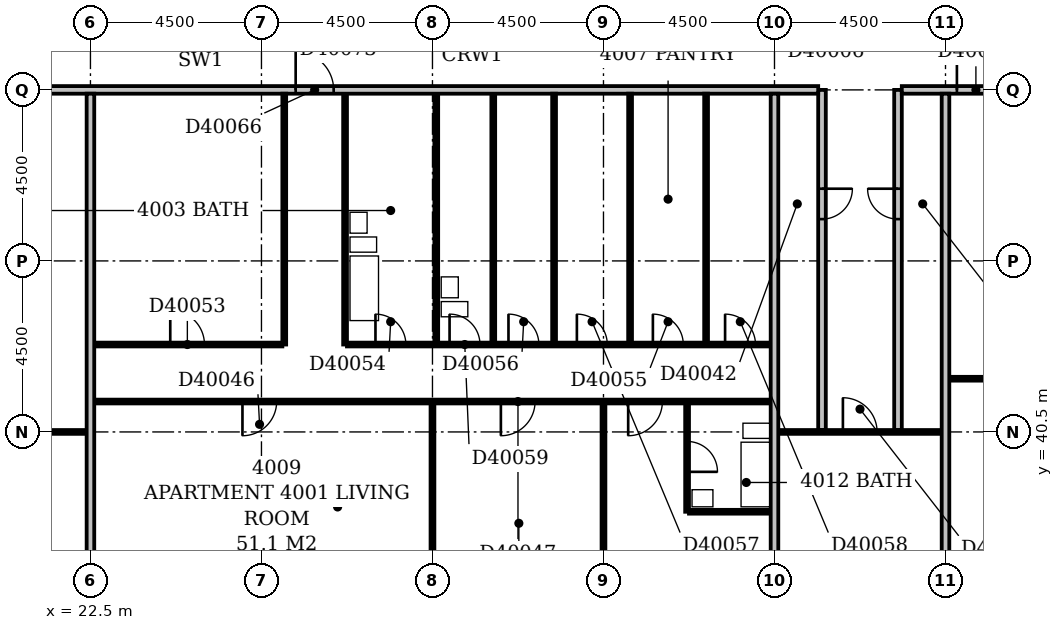
"""IFC4 building model, lengths in metres.
Left out: names, types, materials, properties, quantities, classifications, styles, units other than length and angle.
Written with IfcOpenShell. Run it as: python <this file> out.ifc"""

import sys

from ifc_helpers import new_model, si_unit, direction, frame, frame_2d, origin, place, context, subcontext, project, spatial, rectangle, extrude, element, fill, save


model = new_model("IFC4")
c1 = context("Model", 3, precision=1e-05, world=origin(), true_north=direction((0.0, 1.0)))
c2 = subcontext(c1, "Body", "Model", "MODEL_VIEW")
j1 = project(units=[si_unit("LENGTHUNIT", "METRE"), si_unit("PLANEANGLEUNIT", "RADIAN")], contexts=[c1])
p1 = place(None, origin())
s1 = spatial("IfcSite", under=j1, at=p1, CompositionType="ELEMENT")
p2 = place(p1, origin())
s2 = spatial("IfcBuilding", under=s1, at=p2, CompositionType="ELEMENT")
p3 = place(p2, frame((0.0, 0.0, 159.2)))
s3 = spatial("IfcBuildingStorey", under=s2, at=p3, CompositionType="ELEMENT", Elevation=159.2)
p4 = place(p3, frame((22.5, 36.5, 0.0), z_axis=(0.0, 0.0, 1.0), x_axis=(0.0, 1.0, 0.0)))
e1 = element("IfcWall", 1, at=p4, inside=s3, PredefinedType="PARTITIONING", context=c2, shape_type="SweptSolid", body=[
    extrude(rectangle(XDim=12.9, YDim=0.2, at=frame_2d((6.45, 0.0))), origin(), (0.0, 0.0, 1.0), 3.3),
])
p5 = place(p3, frame((31.5, 36.5, 0.0), z_axis=(0.0, 0.0, 1.0), x_axis=(0.0, 1.0, 0.0)))
e2 = element("IfcWall", 2, at=p5, inside=s3, PredefinedType="PARTITIONING", context=c2, shape_type="SweptSolid", body=[
    extrude(rectangle(XDim=4.75, YDim=0.1, at=frame_2d((2.375, 0.0))), origin(), (0.0, 0.0, 1.0), 3.3),
])
p6 = place(p3, frame((36.0, 36.5, 0.0), z_axis=(0.0, 0.0, 1.0), x_axis=(0.0, 1.0, 0.0)))
e3 = element("IfcWall", 3, at=p6, inside=s3, PredefinedType="PARTITIONING", context=c2, shape_type="SweptSolid", body=[
    extrude(rectangle(XDim=4.75, YDim=0.1, at=frame_2d((2.375, 0.0))), origin(), (0.0, 0.0, 1.0), 2.4),
])
p7 = place(p3, frame((40.5, 36.5, 0.0), z_axis=(0.0, 0.0, 1.0), x_axis=(0.0, 1.0, 0.0)))
e4 = element("IfcWall", 4, at=p7, inside=s3, PredefinedType="PARTITIONING", context=c2, shape_type="SweptSolid", body=[
    extrude(rectangle(XDim=12.9, YDim=0.2, at=frame_2d((6.45, 0.0))), origin(), (0.0, 0.0, 1.0), 3.3),
])
p8 = place(p3, frame((45.0, 36.5, 0.0), z_axis=(0.0, 0.0, 1.0), x_axis=(0.0, 1.0, 0.0)))
e5 = element("IfcWall", 5, at=p8, inside=s3, PredefinedType="PARTITIONING", context=c2, shape_type="SweptSolid", body=[
    extrude(rectangle(XDim=12.9, YDim=0.2, at=frame_2d((6.45, 0.0))), origin(), (0.0, 0.0, 1.0), 2.6),
])
p9 = place(p3, frame((38.2, 38.4, 0.0), z_axis=(0.0, 0.0, 1.0), x_axis=(0.0, 1.0, 0.0)))
e6 = element("IfcWall", 6, at=p9, inside=s3, PredefinedType="PLUMBINGWALL", context=c2, shape_type="SweptSolid", body=[
    extrude(rectangle(XDim=2.85, YDim=0.1, at=frame_2d((1.425, 0.0))), origin(), (0.0, 0.0, 1.0), 3.3),
])
p10 = place(p9, frame((1.05, 0.0, 0.0)))
e7 = element("IfcOpeningElement", 7, at=p10, cuts=e6, PredefinedType="OPENING", context=c2, shape_type="SweptSolid", body=[
    extrude(rectangle(XDim=0.8, YDim=2.1, at=frame_2d((0.4, 1.05))), frame((0.0, 0.062, 0.0), z_axis=(0.0, -1.0, 0.0), x_axis=(1.0, 0.0, 0.0)), (0.0, 0.0, 1.0), 0.124),
])
p11 = place(p3, frame((38.25, 38.4, 0.0), z_axis=(0.0, 0.0, 1.0), x_axis=(1.0, 0.0, 0.0)))
e8 = element("IfcWall", 8, at=p11, inside=s3, PredefinedType="PLUMBINGWALL", context=c2, shape_type="SweptSolid", body=[
    extrude(rectangle(XDim=2.15, YDim=0.1, at=frame_2d((1.075, 0.0))), origin(), (0.0, 0.0, 1.0), 3.3),
])
p12 = place(p3, frame((9.1, 40.5, 0.0), z_axis=(0.0, 0.0, 1.0), x_axis=(1.0, 0.0, 0.0)))
e9 = element("IfcWall", 9, at=p12, inside=s3, PredefinedType="PARTITIONING", context=c2, shape_type="SweptSolid", body=[
    extrude(rectangle(XDim=13.3, YDim=0.1, at=frame_2d((6.65, 0.0))), origin(), (0.0, 0.0, 1.0), 3.3),
])
p13 = place(p3, frame((40.6, 40.5, 0.0), z_axis=(0.0, 0.0, 1.0), x_axis=(1.0, 0.0, 0.0)))
e10 = element("IfcWall", 10, at=p13, inside=s3, PredefinedType="PARTITIONING", context=c2, shape_type="SweptSolid", body=[
    extrude(rectangle(XDim=4.3, YDim=0.1, at=frame_2d((2.15, 0.0))), origin(), (0.0, 0.0, 1.0), 3.3),
])
p14 = place(p13, frame((1.7, 0.0, 0.0)))
e11 = element("IfcOpeningElement", 11, at=p14, cuts=e10, PredefinedType="OPENING", context=c2, shape_type="SweptSolid", body=[
    extrude(rectangle(XDim=0.9, YDim=2.1, at=frame_2d((0.45, 1.05))), frame((0.0, 0.062, 0.0), z_axis=(0.0, -1.0, 0.0), x_axis=(1.0, 0.0, 0.0)), (0.0, 0.0, 1.0), 0.124),
])
p15 = place(p3, frame((41.75, 40.55, 0.0), z_axis=(0.0, 0.0, 1.0), x_axis=(0.0, 1.0, 0.0)))
e12 = element("IfcWall", 12, at=p15, inside=s3, PredefinedType="PARTITIONING", context=c2, shape_type="SweptSolid", body=[
    extrude(rectangle(XDim=8.95, YDim=0.2, at=frame_2d((4.475, 0.0))), origin(), (0.0, 0.0, 1.0), 3.3),
])
p16 = place(p15, frame((5.55, 0.0, 0.0)))
e13 = element("IfcOpeningElement", 13, at=p16, cuts=e12, PredefinedType="OPENING", context=c2, shape_type="SweptSolid", body=[
    extrude(rectangle(XDim=0.8, YDim=2.1, at=frame_2d((0.4, 1.05))), frame((0.0, 0.112, 0.0), z_axis=(0.0, -1.0, 0.0), x_axis=(1.0, 0.0, 0.0)), (0.0, 0.0, 1.0), 0.224),
])
p17 = place(p3, frame((43.75, 40.55, 0.0), z_axis=(0.0, 0.0, 1.0), x_axis=(0.0, 1.0, 0.0)))
e14 = element("IfcWall", 14, at=p17, inside=s3, PredefinedType="PARTITIONING", context=c2, shape_type="SweptSolid", body=[
    extrude(rectangle(XDim=8.95, YDim=0.2, at=frame_2d((4.475, 0.0))), origin(), (0.0, 0.0, 1.0), 3.3),
])
p18 = place(p17, frame((5.55, 0.0, 0.0)))
e15 = element("IfcOpeningElement", 15, at=p18, cuts=e14, PredefinedType="OPENING", context=c2, shape_type="SweptSolid", body=[
    extrude(rectangle(XDim=0.8, YDim=2.1, at=frame_2d((0.4, 1.05))), frame((0.0, 0.112, 0.0), z_axis=(0.0, -1.0, 0.0), x_axis=(1.0, 0.0, 0.0)), (0.0, 0.0, 1.0), 0.224),
])
p19 = place(p3, frame((22.6, 41.3, 0.0), z_axis=(0.0, 0.0, 1.0), x_axis=(1.0, 0.0, 0.0)))
e16 = element("IfcWall", 16, at=p19, inside=s3, PredefinedType="PARTITIONING", context=c2, shape_type="SweptSolid", body=[
    extrude(rectangle(XDim=17.8, YDim=0.1, at=frame_2d((8.9, 0.0))), origin(), (0.0, 0.0, 1.0), 3.3),
])
p20 = place(p19, frame((3.9, 0.0, 0.0)))
e17 = element("IfcOpeningElement", 17, at=p20, cuts=e16, PredefinedType="OPENING", context=c2, shape_type="SweptSolid", body=[
    extrude(rectangle(XDim=0.9, YDim=2.1, at=frame_2d((0.45, 1.05))), frame((0.0, 0.062, 0.0), z_axis=(0.0, -1.0, 0.0), x_axis=(1.0, 0.0, 0.0)), (0.0, 0.0, 1.0), 0.124),
])
p21 = place(p19, frame((10.7, 0.0, 0.0)))
e18 = element("IfcOpeningElement", 18, at=p21, cuts=e16, PredefinedType="OPENING", context=c2, shape_type="SweptSolid", body=[
    extrude(rectangle(XDim=0.9, YDim=2.1, at=frame_2d((0.45, 1.05))), frame((0.0, 0.062, 0.0), z_axis=(0.0, -1.0, 0.0), x_axis=(1.0, 0.0, 0.0)), (0.0, 0.0, 1.0), 0.124),
])
p22 = place(p19, frame((14.05, 0.0, 0.0)))
e19 = element("IfcOpeningElement", 19, at=p22, cuts=e16, PredefinedType="OPENING", context=c2, shape_type="SweptSolid", body=[
    extrude(rectangle(XDim=0.9, YDim=2.1, at=frame_2d((0.45, 1.05))), frame((0.0, 0.062, 0.0), z_axis=(0.0, -1.0, 0.0), x_axis=(1.0, 0.0, 0.0)), (0.0, 0.0, 1.0), 0.124),
])
p23 = place(p3, frame((45.1, 41.9, 0.0), z_axis=(0.0, 0.0, 1.0), x_axis=(1.0, 0.0, 0.0)))
e20 = element("IfcWall", 20, at=p23, inside=s3, PredefinedType="PARTITIONING", context=c2, shape_type="SweptSolid", body=[
    extrude(rectangle(XDim=13.3, YDim=0.1, at=frame_2d((6.65, 0.0))), origin(), (0.0, 0.0, 1.0), 3.3),
])
p24 = place(p23, frame((1.7, 0.0, 0.0)))
e21 = element("IfcOpeningElement", 21, at=p24, cuts=e20, PredefinedType="OPENING", context=c2, shape_type="SweptSolid", body=[
    extrude(rectangle(XDim=0.9, YDim=2.1, at=frame_2d((0.45, 1.05))), frame((0.0, 0.062, 0.0), z_axis=(0.0, -1.0, 0.0), x_axis=(1.0, 0.0, 0.0)), (0.0, 0.0, 1.0), 0.124),
])
p25 = place(p23, frame((6.2, 0.0, 0.0)))
e22 = element("IfcOpeningElement", 22, at=p25, cuts=e20, PredefinedType="OPENING", context=c2, shape_type="SweptSolid", body=[
    extrude(rectangle(XDim=0.9, YDim=2.1, at=frame_2d((0.45, 1.05))), frame((0.0, 0.062, 0.0), z_axis=(0.0, -1.0, 0.0), x_axis=(1.0, 0.0, 0.0)), (0.0, 0.0, 1.0), 0.124),
])
p26 = place(p23, frame((10.7, 0.0, 0.0)))
e23 = element("IfcOpeningElement", 23, at=p26, cuts=e20, PredefinedType="OPENING", context=c2, shape_type="SweptSolid", body=[
    extrude(rectangle(XDim=0.9, YDim=2.1, at=frame_2d((0.45, 1.05))), frame((0.0, 0.062, 0.0), z_axis=(0.0, -1.0, 0.0), x_axis=(1.0, 0.0, 0.0)), (0.0, 0.0, 1.0), 0.124),
])
p27 = place(p3, frame((22.6, 42.8, 0.0), z_axis=(0.0, 0.0, 1.0), x_axis=(1.0, 0.0, 0.0)))
e24 = element("IfcWall", 24, at=p27, inside=s3, PredefinedType="PARTITIONING", context=c2, shape_type="SweptSolid", body=[
    extrude(rectangle(XDim=4.95, YDim=0.1, at=frame_2d((2.475, 0.0))), origin(), (0.0, 0.0, 1.0), 3.3),
])
p28 = place(p27, frame((2.0, 0.0, 0.0)))
e25 = element("IfcOpeningElement", 25, at=p28, cuts=e24, PredefinedType="OPENING", context=c2, shape_type="SweptSolid", body=[
    extrude(rectangle(XDim=0.9, YDim=2.1, at=frame_2d((0.45, 1.05))), frame((0.0, 0.062, 0.0), z_axis=(0.0, -1.0, 0.0), x_axis=(1.0, 0.0, 0.0)), (0.0, 0.0, 1.0), 0.124),
])
p29 = place(p3, frame((27.6, 42.8, 0.0), z_axis=(0.0, 0.0, 1.0), x_axis=(0.0, 1.0, 0.0)))
e26 = element("IfcWall", 26, at=p29, inside=s3, PredefinedType="PARTITIONING", context=c2, shape_type="SweptSolid", body=[
    extrude(rectangle(XDim=6.6, YDim=0.1, at=frame_2d((3.3, 0.0))), origin(), (0.0, 0.0, 1.0), 2.6),
])
p30 = place(p3, frame((29.2, 42.8, 0.0), z_axis=(0.0, 0.0, 1.0), x_axis=(0.0, 1.0, 0.0)))
e27 = element("IfcWall", 27, at=p30, inside=s3, PredefinedType="PLUMBINGWALL", context=c2, shape_type="SweptSolid", body=[
    extrude(rectangle(XDim=6.6, YDim=0.1, at=frame_2d((3.3, 0.0))), origin(), (0.0, 0.0, 1.0), 3.3),
])
p31 = place(p3, frame((29.25, 42.8, 0.0), z_axis=(0.0, 0.0, 1.0), x_axis=(1.0, 0.0, 0.0)))
e28 = element("IfcWall", 28, at=p31, inside=s3, PredefinedType="PARTITIONING", context=c2, shape_type="SweptSolid", body=[
    extrude(rectangle(XDim=11.15, YDim=0.1, at=frame_2d((5.575, 0.0))), origin(), (0.0, 0.0, 1.0), 3.3),
])
p32 = place(p31, frame((0.75, 0.0, 0.0)))
e29 = element("IfcOpeningElement", 29, at=p32, cuts=e28, PredefinedType="OPENING", context=c2, shape_type="SweptSolid", body=[
    extrude(rectangle(XDim=0.8, YDim=2.1, at=frame_2d((0.4, 1.05))), frame((0.0, 0.062, 0.0), z_axis=(0.0, -1.0, 0.0), x_axis=(1.0, 0.0, 0.0)), (0.0, 0.0, 1.0), 0.124),
])
p33 = place(p31, frame((8.05, 0.0, 0.0)))
e30 = element("IfcOpeningElement", 30, at=p33, cuts=e28, PredefinedType="OPENING", context=c2, shape_type="SweptSolid", body=[
    extrude(rectangle(XDim=0.8, YDim=2.1, at=frame_2d((0.4, 1.05))), frame((0.0, 0.062, 0.0), z_axis=(0.0, -1.0, 0.0), x_axis=(1.0, 0.0, 0.0)), (0.0, 0.0, 1.0), 0.124),
])
p34 = place(p31, frame((4.25, 0.0, 0.0)))
e31 = element("IfcOpeningElement", 31, at=p34, cuts=e28, PredefinedType="OPENING", context=c2, shape_type="SweptSolid", body=[
    extrude(rectangle(XDim=0.8, YDim=2.1, at=frame_2d((0.4, 1.05))), frame((0.0, 0.062, 0.0), z_axis=(0.0, -1.0, 0.0), x_axis=(1.0, 0.0, 0.0)), (0.0, 0.0, 1.0), 0.124),
])
p35 = place(p31, frame((6.05, 0.0, 0.0)))
e32 = element("IfcOpeningElement", 32, at=p35, cuts=e28, PredefinedType="OPENING", context=c2, shape_type="SweptSolid", body=[
    extrude(rectangle(XDim=0.8, YDim=2.1, at=frame_2d((0.4, 1.05))), frame((0.0, 0.062, 0.0), z_axis=(0.0, -1.0, 0.0), x_axis=(1.0, 0.0, 0.0)), (0.0, 0.0, 1.0), 0.124),
])
p36 = place(p31, frame((9.95, 0.0, 0.0)))
e33 = element("IfcOpeningElement", 33, at=p36, cuts=e28, PredefinedType="OPENING", context=c2, shape_type="SweptSolid", body=[
    extrude(rectangle(XDim=0.8, YDim=2.1, at=frame_2d((0.4, 1.05))), frame((0.0, 0.062, 0.0), z_axis=(0.0, -1.0, 0.0), x_axis=(1.0, 0.0, 0.0)), (0.0, 0.0, 1.0), 0.124),
])
p37 = place(p31, frame((2.7, 0.0, 0.0)))
e34 = element("IfcOpeningElement", 34, at=p37, cuts=e28, PredefinedType="OPENING", context=c2, shape_type="SweptSolid", body=[
    extrude(rectangle(XDim=0.8, YDim=2.1, at=frame_2d((0.4, 1.05))), frame((0.0, 0.062, 0.0), z_axis=(0.0, -1.0, 0.0), x_axis=(1.0, 0.0, 0.0)), (0.0, 0.0, 1.0), 0.124),
])
for number, where, z_axis, x_axis in (
    (35, (31.6, 42.85, 0.0), (0.0, 0.0, 1.0), (0.0, 1.0, 0.0)),
    (36, (33.1, 42.85, 0.0), (0.0, 0.0, 1.0), (0.0, 1.0, 0.0)),
):
    element("IfcWall", number, at=place(p3, frame(where, z_axis=z_axis, x_axis=x_axis)), inside=s3, PredefinedType="PLUMBINGWALL", context=c2, shape_type="SweptSolid", body=[
        extrude(rectangle(XDim=6.55, YDim=0.1, at=frame_2d((3.275, 0.0))), origin(), (0.0, 0.0, 1.0), 3.3),
    ])
p38 = place(p3, frame((34.7, 42.85, 0.0), z_axis=(0.0, 0.0, 1.0), x_axis=(0.0, 1.0, 0.0)))
e37 = element("IfcWall", 37, at=p38, inside=s3, PredefinedType="PARTITIONING", context=c2, shape_type="SweptSolid", body=[
    extrude(rectangle(XDim=6.55, YDim=0.1, at=frame_2d((3.275, 0.0))), origin(), (0.0, 0.0, 1.0), 3.3),
])
p39 = place(p3, frame((36.7, 42.85, 0.0), z_axis=(0.0, 0.0, 1.0), x_axis=(0.0, 1.0, 0.0)))
e38 = element("IfcWall", 38, at=p39, inside=s3, PredefinedType="PARTITIONING", context=c2, shape_type="SweptSolid", body=[
    extrude(rectangle(XDim=6.55, YDim=0.1, at=frame_2d((3.275, 0.0))), origin(), (0.0, 0.0, 1.0), 2.4),
])
p40 = place(p3, frame((38.7, 42.85, 0.0), z_axis=(0.0, 0.0, 1.0), x_axis=(0.0, 1.0, 0.0)))
e39 = element("IfcWall", 39, at=p40, inside=s3, PredefinedType="PARTITIONING", context=c2, shape_type="SweptSolid", body=[
    extrude(rectangle(XDim=6.55, YDim=0.1, at=frame_2d((3.275, 0.0))), origin(), (0.0, 0.0, 1.0), 3.3),
])
p41 = place(p3, frame((9.1, 49.5, 0.0), z_axis=(0.0, 0.0, 1.0), x_axis=(1.0, 0.0, 0.0)))
e40 = element("IfcWall", 40, at=p41, inside=s3, PredefinedType="PARTITIONING", context=c2, shape_type="SweptSolid", body=[
    extrude(rectangle(XDim=32.55, YDim=0.2, at=frame_2d((16.275, 0.0))), origin(), (0.0, 0.0, 1.0), 3.3),
])
p42 = place(p41, frame((18.8, 0.0, 0.0)))
e41 = element("IfcOpeningElement", 41, at=p42, cuts=e40, PredefinedType="OPENING", context=c2, shape_type="SweptSolid", body=[
    extrude(rectangle(XDim=1.0, YDim=2.1, at=frame_2d((0.5, 1.05))), frame((0.0, 0.112, 0.0), z_axis=(0.0, -1.0, 0.0), x_axis=(1.0, 0.0, 0.0)), (0.0, 0.0, 1.0), 0.224),
])
p43 = place(p41, frame((6.15, 0.0, 0.0)))
e42 = element("IfcOpeningElement", 42, at=p43, cuts=e40, PredefinedType="OPENING", context=c2, shape_type="SweptSolid", body=[
    extrude(rectangle(XDim=0.9, YDim=2.1, at=frame_2d((0.45, 1.05))), frame((0.0, 0.112, 0.0), z_axis=(0.0, -1.0, 0.0), x_axis=(1.0, 0.0, 0.0)), (0.0, 0.0, 1.0), 0.224),
])
p44 = place(p3, frame((43.85, 49.5, 0.0), z_axis=(0.0, 0.0, 1.0), x_axis=(1.0, 0.0, 0.0)))
e43 = element("IfcWall", 43, at=p44, inside=s3, PredefinedType="PARTITIONING", context=c2, shape_type="SweptSolid", body=[
    extrude(rectangle(XDim=15.8, YDim=0.2, at=frame_2d((7.9, 0.0))), origin(), (0.0, 0.0, 1.0), 3.3),
])
p45 = place(p44, frame((1.45, 0.0, 0.0)))
e44 = element("IfcOpeningElement", 44, at=p45, cuts=e43, PredefinedType="OPENING", context=c2, shape_type="SweptSolid", body=[
    extrude(rectangle(XDim=1.0, YDim=2.1, at=frame_2d((0.5, 1.05))), frame((0.0, 0.112, 0.0), z_axis=(0.0, -1.0, 0.0), x_axis=(1.0, 0.0, 0.0)), (0.0, 0.0, 1.0), 0.224),
])
p46 = place(p10, frame((0.8, 0.0, 0.0), z_axis=(0.0, 0.0, 1.0), x_axis=(-1.0, 0.0, 0.0)))
e45 = element("IfcDoor", 45, at=p46, inside=s3, OperationType="SINGLE_SWING_RIGHT", PredefinedType="DOOR", context=c2, shape_type="SweptSolid", body=[
    extrude(rectangle(XDim=0.8, YDim=2.1, at=frame_2d((0.4, 1.05))), frame((0.0, 0.025, 0.0), z_axis=(0.0, -1.0, 0.0), x_axis=(1.0, 0.0, 0.0)), (0.0, 0.0, 1.0), 0.05),
])
fill(e7, e45)
p47 = place(p14, origin())
e46 = element("IfcDoor", 46, at=p47, inside=s3, OperationType="SINGLE_SWING_LEFT", PredefinedType="DOOR", context=c2, shape_type="SweptSolid", body=[
    extrude(rectangle(XDim=0.9, YDim=2.1, at=frame_2d((0.45, 1.05))), frame((0.0, 0.025, 0.0), z_axis=(0.0, -1.0, 0.0), x_axis=(1.0, 0.0, 0.0)), (0.0, 0.0, 1.0), 0.05),
])
fill(e11, e46)
p48 = place(p16, origin())
e47 = element("IfcDoor", 47, at=p48, inside=s3, OperationType="SINGLE_SWING_RIGHT", PredefinedType="DOOR", context=c2, shape_type="SweptSolid", body=[
    extrude(rectangle(XDim=0.8, YDim=2.1, at=frame_2d((0.4, 1.05))), frame((0.0, 0.025, 0.0), z_axis=(0.0, -1.0, 0.0), x_axis=(1.0, 0.0, 0.0)), (0.0, 0.0, 1.0), 0.05),
])
fill(e13, e47)
p49 = place(p18, frame((0.8, 0.0, 0.0), z_axis=(0.0, 0.0, 1.0), x_axis=(-1.0, 0.0, 0.0)))
e48 = element("IfcDoor", 48, at=p49, inside=s3, OperationType="SINGLE_SWING_LEFT", PredefinedType="DOOR", context=c2, shape_type="SweptSolid", body=[
    extrude(rectangle(XDim=0.8, YDim=2.1, at=frame_2d((0.4, 1.05))), frame((0.0, 0.025, 0.0), z_axis=(0.0, -1.0, 0.0), x_axis=(1.0, 0.0, 0.0)), (0.0, 0.0, 1.0), 0.05),
])
fill(e15, e48)
p50 = place(p20, frame((0.9, 0.0, 0.0), z_axis=(0.0, 0.0, 1.0), x_axis=(-1.0, 0.0, 0.0)))
e49 = element("IfcDoor", 49, at=p50, inside=s3, OperationType="SINGLE_SWING_RIGHT", PredefinedType="DOOR", context=c2, shape_type="SweptSolid", body=[
    extrude(rectangle(XDim=0.9, YDim=2.1, at=frame_2d((0.45, 1.05))), frame((0.0, 0.025, 0.0), z_axis=(0.0, -1.0, 0.0), x_axis=(1.0, 0.0, 0.0)), (0.0, 0.0, 1.0), 0.05),
])
fill(e17, e49)
p51 = place(p21, frame((0.9, 0.0, 0.0), z_axis=(0.0, 0.0, 1.0), x_axis=(-1.0, 0.0, 0.0)))
e50 = element("IfcDoor", 50, at=p51, inside=s3, OperationType="SINGLE_SWING_RIGHT", PredefinedType="DOOR", context=c2, shape_type="SweptSolid", body=[
    extrude(rectangle(XDim=0.9, YDim=2.1, at=frame_2d((0.45, 1.05))), frame((0.0, 0.025, 0.0), z_axis=(0.0, -1.0, 0.0), x_axis=(1.0, 0.0, 0.0)), (0.0, 0.0, 1.0), 0.05),
])
fill(e18, e50)
p52 = place(p22, frame((0.9, 0.0, 0.0), z_axis=(0.0, 0.0, 1.0), x_axis=(-1.0, 0.0, 0.0)))
e51 = element("IfcDoor", 51, at=p52, inside=s3, OperationType="SINGLE_SWING_RIGHT", PredefinedType="DOOR", context=c2, shape_type="SweptSolid", body=[
    extrude(rectangle(XDim=0.9, YDim=2.1, at=frame_2d((0.45, 1.05))), frame((0.0, 0.025, 0.0), z_axis=(0.0, -1.0, 0.0), x_axis=(1.0, 0.0, 0.0)), (0.0, 0.0, 1.0), 0.05),
])
fill(e19, e51)
p53 = place(p28, origin())
e52 = element("IfcDoor", 52, at=p53, inside=s3, OperationType="SINGLE_SWING_LEFT", PredefinedType="DOOR", context=c2, shape_type="SweptSolid", body=[
    extrude(rectangle(XDim=0.9, YDim=2.1, at=frame_2d((0.45, 1.05))), frame((0.0, 0.025, 0.0), z_axis=(0.0, -1.0, 0.0), x_axis=(1.0, 0.0, 0.0)), (0.0, 0.0, 1.0), 0.05),
])
fill(e25, e52)
p54 = place(p32, origin())
e53 = element("IfcDoor", 53, at=p54, inside=s3, OperationType="SINGLE_SWING_LEFT", PredefinedType="DOOR", context=c2, shape_type="SweptSolid", body=[
    extrude(rectangle(XDim=0.8, YDim=2.1, at=frame_2d((0.4, 1.05))), frame((0.0, 0.025, 0.0), z_axis=(0.0, -1.0, 0.0), x_axis=(1.0, 0.0, 0.0)), (0.0, 0.0, 1.0), 0.05),
])
fill(e29, e53)
p55 = place(p33, origin())
e54 = element("IfcDoor", 54, at=p55, inside=s3, OperationType="SINGLE_SWING_LEFT", PredefinedType="DOOR", context=c2, shape_type="SweptSolid", body=[
    extrude(rectangle(XDim=0.8, YDim=2.1, at=frame_2d((0.4, 1.05))), frame((0.0, 0.025, 0.0), z_axis=(0.0, -1.0, 0.0), x_axis=(1.0, 0.0, 0.0)), (0.0, 0.0, 1.0), 0.05),
])
fill(e30, e54)
p56 = place(p34, origin())
e55 = element("IfcDoor", 55, at=p56, inside=s3, OperationType="SINGLE_SWING_LEFT", PredefinedType="DOOR", context=c2, shape_type="SweptSolid", body=[
    extrude(rectangle(XDim=0.8, YDim=2.1, at=frame_2d((0.4, 1.05))), frame((0.0, 0.025, 0.0), z_axis=(0.0, -1.0, 0.0), x_axis=(1.0, 0.0, 0.0)), (0.0, 0.0, 1.0), 0.05),
])
fill(e31, e55)
p57 = place(p35, origin())
e56 = element("IfcDoor", 56, at=p57, inside=s3, OperationType="SINGLE_SWING_LEFT", PredefinedType="DOOR", context=c2, shape_type="SweptSolid", body=[
    extrude(rectangle(XDim=0.8, YDim=2.1, at=frame_2d((0.4, 1.05))), frame((0.0, 0.025, 0.0), z_axis=(0.0, -1.0, 0.0), x_axis=(1.0, 0.0, 0.0)), (0.0, 0.0, 1.0), 0.05),
])
fill(e32, e56)
p58 = place(p36, origin())
e57 = element("IfcDoor", 57, at=p58, inside=s3, OperationType="SINGLE_SWING_LEFT", PredefinedType="DOOR", context=c2, shape_type="SweptSolid", body=[
    extrude(rectangle(XDim=0.8, YDim=2.1, at=frame_2d((0.4, 1.05))), frame((0.0, 0.025, 0.0), z_axis=(0.0, -1.0, 0.0), x_axis=(1.0, 0.0, 0.0)), (0.0, 0.0, 1.0), 0.05),
])
fill(e33, e57)
p59 = place(p37, origin())
e58 = element("IfcDoor", 58, at=p59, inside=s3, OperationType="SINGLE_SWING_LEFT", PredefinedType="DOOR", context=c2, shape_type="SweptSolid", body=[
    extrude(rectangle(XDim=0.8, YDim=2.1, at=frame_2d((0.4, 1.05))), frame((0.0, 0.025, 0.0), z_axis=(0.0, -1.0, 0.0), x_axis=(1.0, 0.0, 0.0)), (0.0, 0.0, 1.0), 0.05),
])
fill(e34, e58)
p60 = place(p42, origin())
e59 = element("IfcDoor", 59, at=p60, inside=s3, OperationType="SINGLE_SWING_LEFT", PredefinedType="DOOR", context=c2, shape_type="SweptSolid", body=[
    extrude(rectangle(XDim=1.0, YDim=2.1, at=frame_2d((0.5, 1.05))), frame((0.0, 0.025, 0.0), z_axis=(0.0, -1.0, 0.0), x_axis=(1.0, 0.0, 0.0)), (0.0, 0.0, 1.0), 0.05),
])
fill(e41, e59)
p61 = place(p45, origin())
e60 = element("IfcDoor", 60, at=p61, inside=s3, OperationType="SINGLE_SWING_LEFT", PredefinedType="DOOR", context=c2, shape_type="SweptSolid", body=[
    extrude(rectangle(XDim=1.0, YDim=2.1, at=frame_2d((0.5, 1.05))), frame((0.0, 0.025, 0.0), z_axis=(0.0, -1.0, 0.0), x_axis=(1.0, 0.0, 0.0)), (0.0, 0.0, 1.0), 0.05),
])
fill(e44, e60)
save(model, sys.argv[1])
